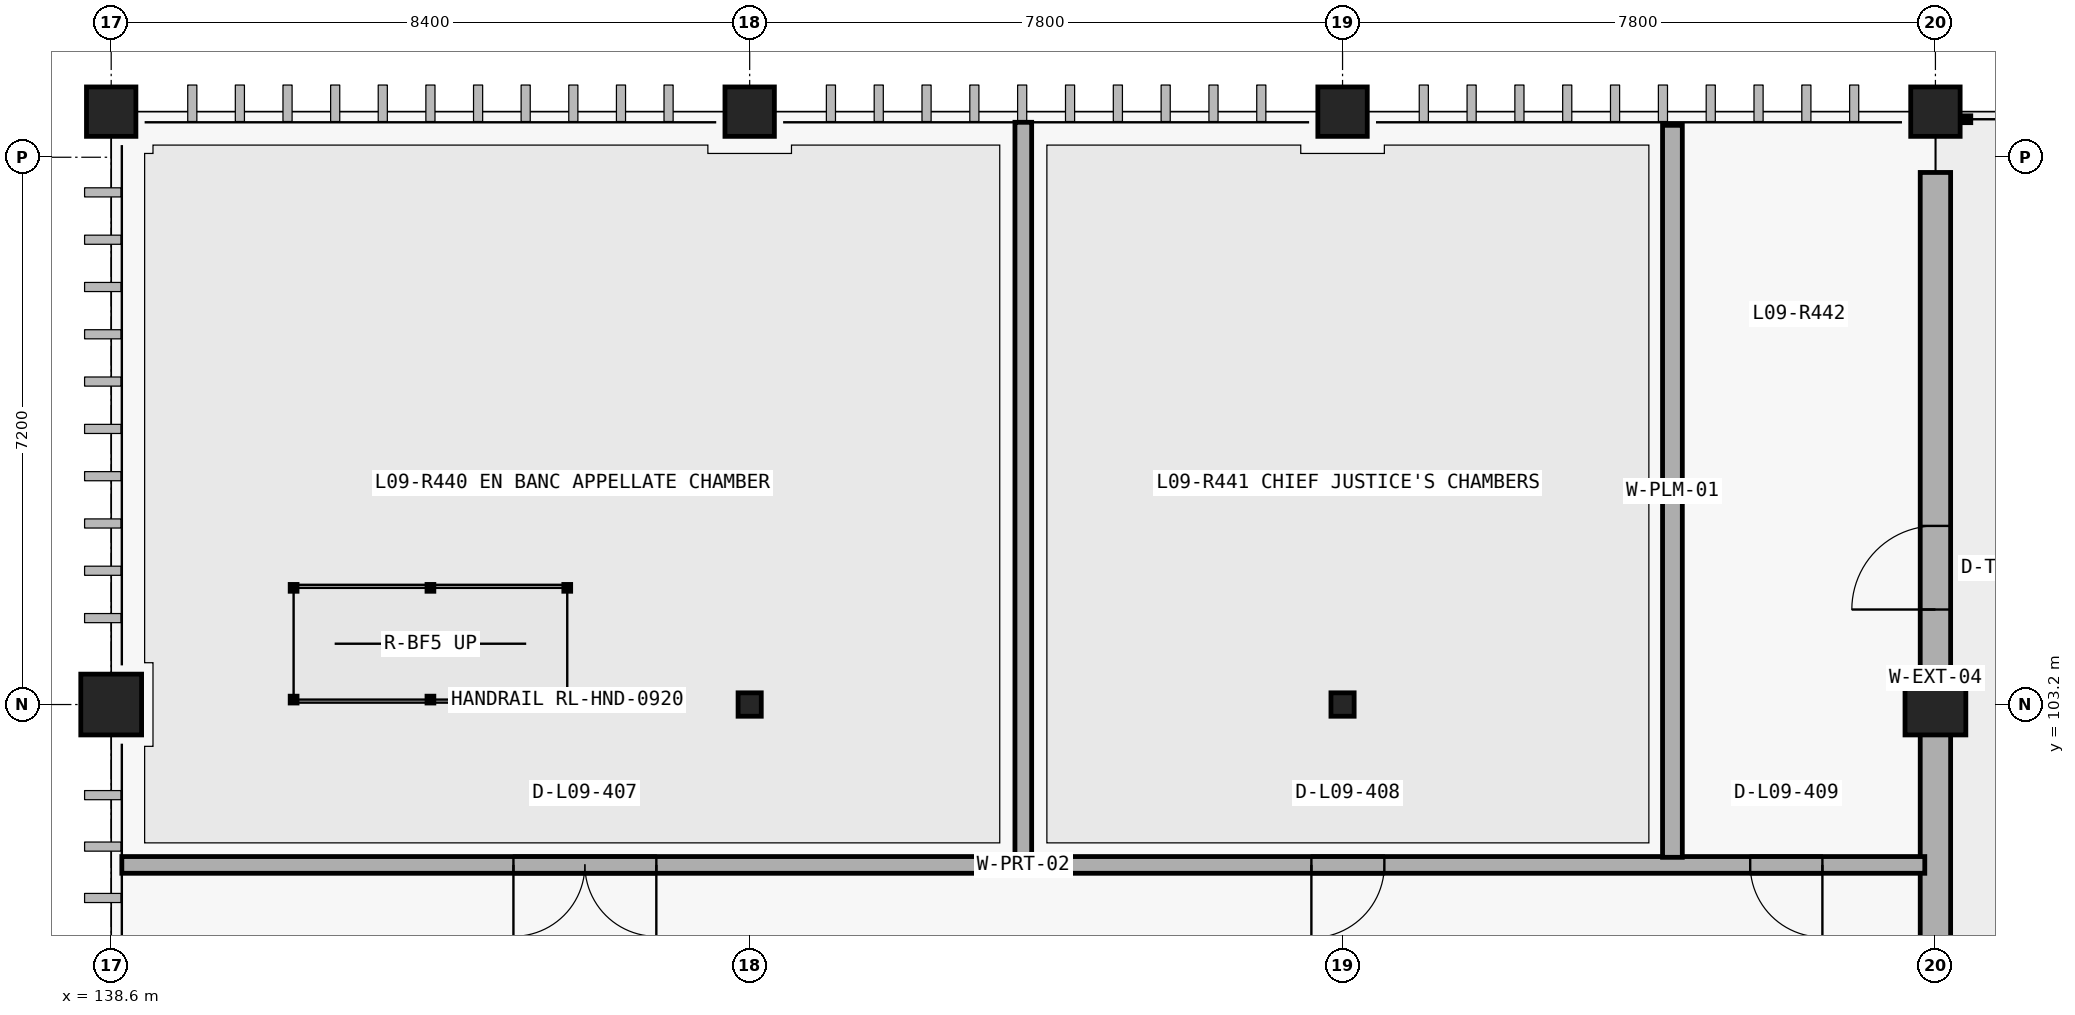
"""IFC4 building model, lengths in metres.
Left out: names, types, materials, properties, quantities, classifications, styles, units other than length and angle.
Written with IfcOpenShell. Run it as: python <this file> out.ifc"""

import sys

from ifc_helpers import new_model, si_unit, direction, frame, frame_2d, origin_with_axes, origin_2d_with_axis, place, context, subcontext, project, spatial, rectangle, circle, i_section, extrude, element, fill, save


model = new_model("IFC4")
c1 = context("Model", 3, precision=1e-05, world=origin_with_axes(), true_north=direction((0.0, 1.0)))
c2 = subcontext(c1, "Body", "Model", "MODEL_VIEW")
j1 = project(units=[si_unit("LENGTHUNIT", "METRE"), si_unit("PLANEANGLEUNIT", "RADIAN")], contexts=[c1])
p1 = place(None, origin_with_axes())
s1 = spatial("IfcSite", under=j1, at=p1, CompositionType="ELEMENT")
p2 = place(p1, origin_with_axes())
s2 = spatial("IfcBuilding", under=s1, at=p2, CompositionType="ELEMENT")
p3 = place(p2, frame((0.0, 0.0, 43.5), z_axis=(0.0, 0.0, 1.0), x_axis=(1.0, 0.0, 0.0)))
s3 = spatial("IfcBuildingStorey", under=s2, at=p3, CompositionType="ELEMENT", Elevation=43.5)
p4 = place(None, frame((162.6, 96.9, 43.5), z_axis=(0.0, 0.0, 1.0), x_axis=(0.0, 1.0, 0.0)))
e1 = element("IfcWall", 1, at=p4, inside=s3, PredefinedType="SOLIDWALL", context=c2, shape_type="SweptSolid", body=[
    extrude(rectangle(XDim=13.3, YDim=0.4, at=frame_2d((6.65, 0.0), x_axis=(1.0, 0.0))), origin_with_axes(), (0.0, 0.0, 1.0), 3.774),
])
p5 = place(None, frame((162.6, 105.0, 43.5), z_axis=(0.0, 0.0, 1.0), x_axis=(0.0, 1.0, 0.0)))
e2 = element("IfcOpeningElement", 2, at=p5, cuts=e1, PredefinedType="OPENING", context=c2, shape_type="SweptSolid", body=[
    extrude(rectangle(XDim=1.1, YDim=2.3, at=frame_2d((0.0, 1.15), x_axis=(1.0, 0.0))), frame((0.0, 0.21, 0.0), z_axis=(0.0, -1.0, 0.0), x_axis=(1.0, 0.0, 0.0)), (0.0, 0.0, 1.0), 0.42),
])
p6 = place(None, frame((138.74, 101.09, 43.5), z_axis=(0.0, 0.0, 1.0), x_axis=(1.0, 0.0, 0.0)))
e3 = element("IfcWall", 3, at=p6, inside=s3, PredefinedType="PARTITIONING", context=c2, shape_type="SweptSolid", body=[
    extrude(rectangle(XDim=23.72, YDim=0.22, at=frame_2d((11.86, 0.0), x_axis=(1.0, 0.0))), origin_with_axes(), (0.0, 0.0, 1.0), 4.18),
])
p7 = place(None, frame((144.832, 101.09, 43.5), z_axis=(0.0, 0.0, 1.0), x_axis=(1.0, 0.0, 0.0)))
e4 = element("IfcOpeningElement", 4, at=p7, cuts=e3, PredefinedType="OPENING", context=c2, shape_type="SweptSolid", body=[
    extrude(rectangle(XDim=1.88, YDim=2.56, at=frame_2d((0.0, 1.28), x_axis=(1.0, 0.0))), frame((0.0, 0.12, 0.0), z_axis=(0.0, -1.0, 0.0), x_axis=(1.0, 0.0, 0.0)), (0.0, 0.0, 1.0), 0.24),
])
p8 = place(None, frame((154.87, 101.09, 43.5), z_axis=(0.0, 0.0, 1.0), x_axis=(1.0, 0.0, 0.0)))
e5 = element("IfcOpeningElement", 5, at=p8, cuts=e3, PredefinedType="OPENING", context=c2, shape_type="SweptSolid", body=[
    extrude(rectangle(XDim=0.96, YDim=2.2, at=frame_2d((0.0, 1.1), x_axis=(1.0, 0.0))), frame((0.0, 0.12, 0.0), z_axis=(0.0, -1.0, 0.0), x_axis=(1.0, 0.0, 0.0)), (0.0, 0.0, 1.0), 0.24),
])
p9 = place(None, frame((160.638, 101.09, 43.5), z_axis=(0.0, 0.0, 1.0), x_axis=(1.0, 0.0, 0.0)))
e6 = element("IfcOpeningElement", 6, at=p9, cuts=e3, PredefinedType="OPENING", context=c2, shape_type="SweptSolid", body=[
    extrude(rectangle(XDim=0.95, YDim=2.1, at=frame_2d((0.0, 1.05), x_axis=(1.0, 0.0))), frame((0.0, 0.12, 0.0), z_axis=(0.0, -1.0, 0.0), x_axis=(1.0, 0.0, 0.0)), (0.0, 0.0, 1.0), 0.24),
])
p10 = place(None, frame((159.14, 101.19, 43.5), z_axis=(0.0, 0.0, 1.0), x_axis=(0.0, 1.0, 0.0)))
e7 = element("IfcWall", 7, at=p10, inside=s3, PredefinedType="PLUMBINGWALL", context=c2, shape_type="SweptSolid", body=[
    extrude(rectangle(XDim=9.63, YDim=0.26, at=frame_2d((4.815, 0.0), x_axis=(1.0, 0.0))), origin_with_axes(), (0.0, 0.0, 1.0), 4.18),
])
p11 = place(None, frame((150.6, 101.09, 43.5), z_axis=(0.0, 0.0, 1.0), x_axis=(0.0, 1.0, 0.0)))
e8 = element("IfcWall", 8, at=p11, inside=s3, PredefinedType="PARTITIONING", context=c2, shape_type="SweptSolid", body=[
    extrude(rectangle(XDim=9.77, YDim=0.22, at=frame_2d((4.885, 0.0), x_axis=(1.0, 0.0))), origin_with_axes(), (0.0, 0.0, 1.0), 4.18),
])
p12 = place(None, frame((138.6, 103.2, 43.5), z_axis=(0.0, 0.0, 1.0), x_axis=(1.0, 0.0, 0.0)))
e9 = element("IfcColumn", 9, at=p12, inside=s3, PredefinedType="COLUMN", context=c2, shape_type="SweptSolid", body=[
    extrude(circle(Radius=0.4, at=origin_2d_with_axis()), origin_with_axes(), (0.0, 0.0, 1.0), 4.5),
])
p13 = place(None, frame((138.6, 111.0, 43.5), z_axis=(0.0, 0.0, 1.0), x_axis=(1.0, 0.0, 0.0)))
e10 = element("IfcColumn", 10, at=p13, inside=s3, PredefinedType="COLUMN", context=c2, shape_type="SweptSolid", body=[
    extrude(circle(Radius=0.325, at=origin_2d_with_axis()), origin_with_axes(), (0.0, 0.0, 1.0), 4.5),
])
p14 = place(None, frame((147.0, 103.2, 43.5), z_axis=(0.0, 0.0, 1.0), x_axis=(1.0, 0.0, 0.0)))
e11 = element("IfcColumn", 11, at=p14, inside=s3, PredefinedType="COLUMN", context=c2, shape_type="SweptSolid", body=[
    extrude(i_section(OverallWidth=0.305, OverallDepth=0.308, WebThickness=0.01, FlangeThickness=0.015, at=origin_2d_with_axis()), origin_with_axes(), (0.0, 0.0, 1.0), 4.5),
])
p15 = place(None, frame((147.0, 111.0, 43.5), z_axis=(0.0, 0.0, 1.0), x_axis=(1.0, 0.0, 0.0)))
e12 = element("IfcColumn", 12, at=p15, inside=s3, PredefinedType="COLUMN", context=c2, shape_type="SweptSolid", body=[
    extrude(circle(Radius=0.325, at=origin_2d_with_axis()), origin_with_axes(), (0.0, 0.0, 1.0), 4.5),
])
p16 = place(None, frame((154.8, 103.2, 43.5), z_axis=(0.0, 0.0, 1.0), x_axis=(1.0, 0.0, 0.0)))
e13 = element("IfcColumn", 13, at=p16, inside=s3, PredefinedType="COLUMN", context=c2, shape_type="SweptSolid", body=[
    extrude(i_section(OverallWidth=0.305, OverallDepth=0.308, WebThickness=0.01, FlangeThickness=0.015, at=origin_2d_with_axis()), origin_with_axes(), (0.0, 0.0, 1.0), 4.5),
])
p17 = place(None, frame((154.8, 111.0, 43.5), z_axis=(0.0, 0.0, 1.0), x_axis=(1.0, 0.0, 0.0)))
e14 = element("IfcColumn", 14, at=p17, inside=s3, PredefinedType="COLUMN", context=c2, shape_type="SweptSolid", body=[
    extrude(circle(Radius=0.325, at=origin_2d_with_axis()), origin_with_axes(), (0.0, 0.0, 1.0), 4.5),
])
p18 = place(None, frame((162.6, 103.2, 43.5), z_axis=(0.0, 0.0, 1.0), x_axis=(1.0, 0.0, 0.0)))
e15 = element("IfcColumn", 15, at=p18, inside=s3, PredefinedType="COLUMN", context=c2, shape_type="SweptSolid", body=[
    extrude(circle(Radius=0.4, at=origin_2d_with_axis()), origin_with_axes(), (0.0, 0.0, 1.0), 4.5),
])
p19 = place(None, frame((162.6, 111.0, 43.5), z_axis=(0.0, 0.0, 1.0), x_axis=(1.0, 0.0, 0.0)))
e16 = element("IfcColumn", 16, at=p19, inside=s3, PredefinedType="COLUMN", context=c2, shape_type="SweptSolid", body=[
    extrude(circle(Radius=0.325, at=origin_2d_with_axis()), origin_with_axes(), (0.0, 0.0, 1.0), 4.5),
])
p20 = place(None, frame((162.6, 105.0, 43.5), z_axis=(0.0, 0.0, 1.0), x_axis=(0.0, 1.0, 0.0)))
e17 = element("IfcDoor", 17, at=p20, inside=s3, OperationType="SINGLE_SWING_LEFT", PredefinedType="DOOR", context=c2, shape_type="SweptSolid", body=[
    extrude(rectangle(XDim=1.1, YDim=2.3, at=frame_2d((0.0, 1.15), x_axis=(1.0, 0.0))), frame((0.0, 0.04, 0.0), z_axis=(0.0, -1.0, 0.0), x_axis=(1.0, 0.0, 0.0)), (0.0, 0.0, 1.0), 0.08),
])
fill(e2, e17)
p21 = place(None, frame((144.832, 101.09, 43.5), z_axis=(0.0, 0.0, 1.0), x_axis=(-1.0, 0.0, 0.0)))
e18 = element("IfcDoor", 18, at=p21, inside=s3, OperationType="DOUBLE_DOOR_SINGLE_SWING", PredefinedType="DOOR", context=c2, shape_type="SweptSolid", body=[
    extrude(rectangle(XDim=1.88, YDim=2.56, at=frame_2d((0.0, 1.28), x_axis=(1.0, 0.0))), frame((0.0, 0.04, 0.0), z_axis=(0.0, -1.0, 0.0), x_axis=(1.0, 0.0, 0.0)), (0.0, 0.0, 1.0), 0.08),
])
fill(e4, e18)
p22 = place(None, frame((154.87, 101.09, 43.5), z_axis=(0.0, 0.0, 1.0), x_axis=(-1.0, 0.0, 0.0)))
e19 = element("IfcDoor", 19, at=p22, inside=s3, OperationType="SINGLE_SWING_LEFT", PredefinedType="DOOR", context=c2, shape_type="SweptSolid", body=[
    extrude(rectangle(XDim=0.96, YDim=2.2, at=frame_2d((0.0, 1.1), x_axis=(1.0, 0.0))), frame((0.0, 0.04, 0.0), z_axis=(0.0, -1.0, 0.0), x_axis=(1.0, 0.0, 0.0)), (0.0, 0.0, 1.0), 0.08),
])
fill(e5, e19)
p23 = place(None, frame((160.638, 101.09, 43.5), z_axis=(0.0, 0.0, 1.0), x_axis=(-1.0, 0.0, 0.0)))
e20 = element("IfcDoor", 20, at=p23, inside=s3, OperationType="SINGLE_SWING_RIGHT", PredefinedType="DOOR", context=c2, shape_type="SweptSolid", body=[
    extrude(rectangle(XDim=0.95, YDim=2.1, at=frame_2d((0.0, 1.05), x_axis=(1.0, 0.0))), frame((0.0, 0.04, 0.0), z_axis=(0.0, -1.0, 0.0), x_axis=(1.0, 0.0, 0.0)), (0.0, 0.0, 1.0), 0.08),
])
fill(e6, e20)
save(model, sys.argv[1])
